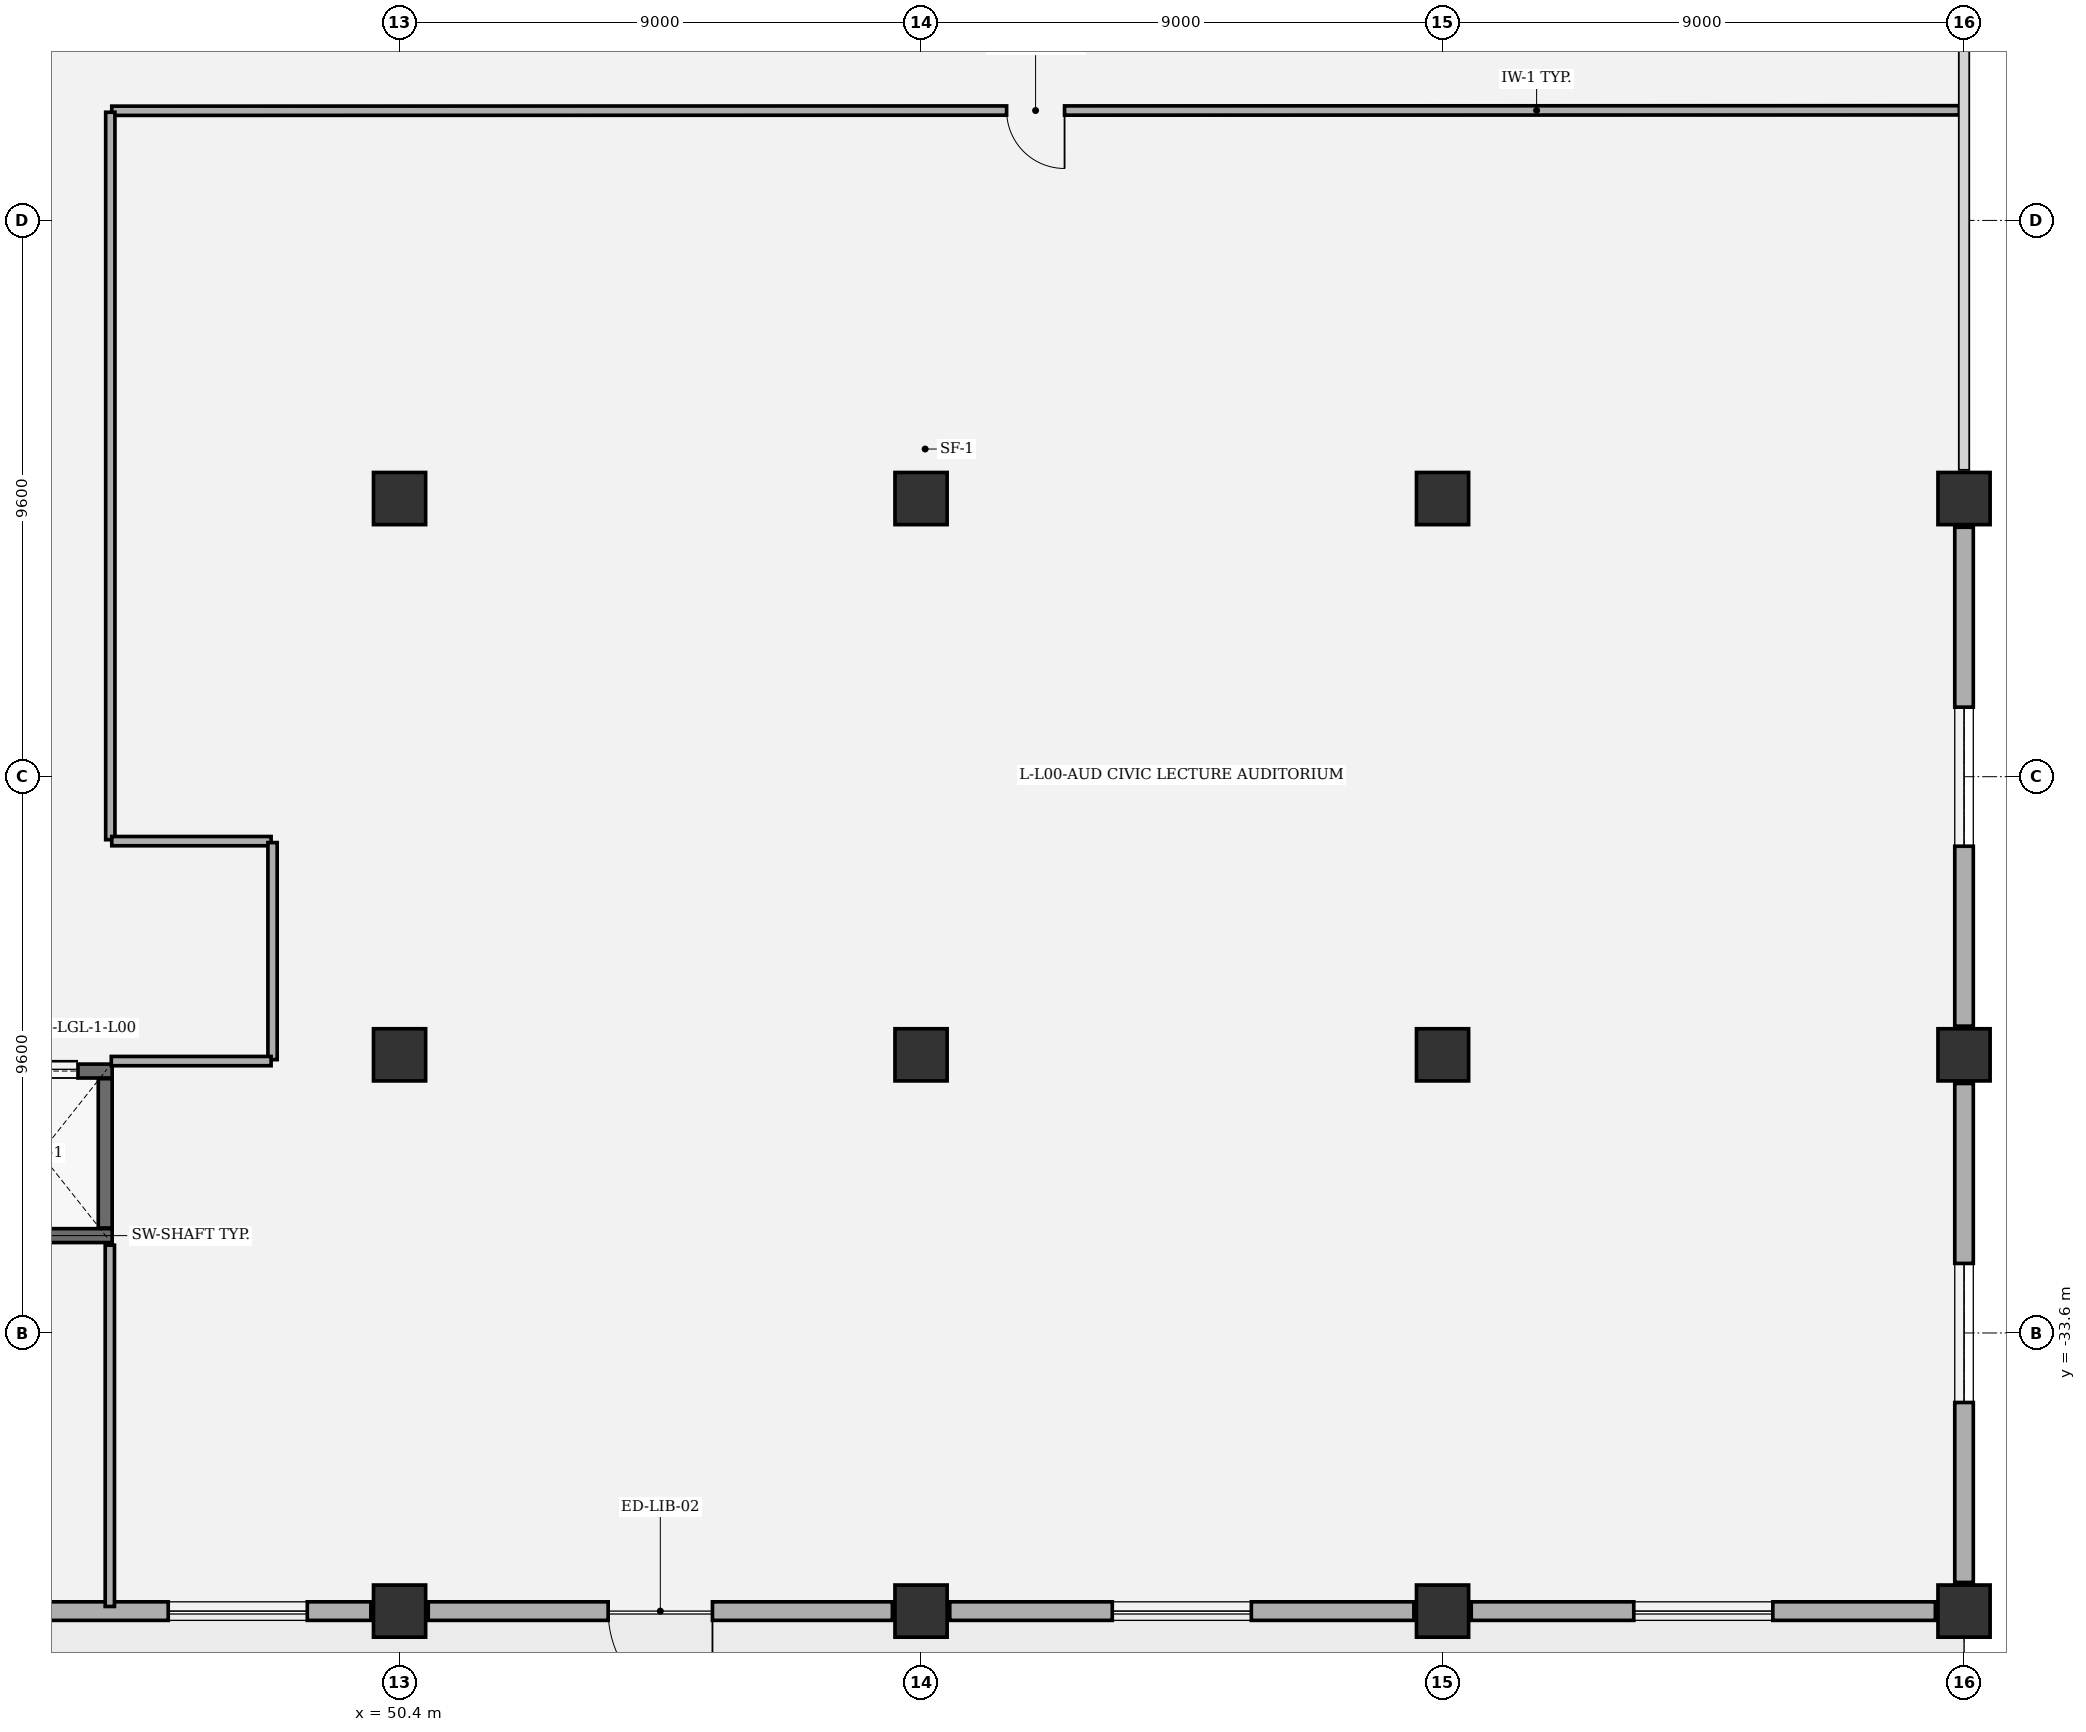
"""IFC4 building model, lengths in metres.
Left out: names, types, materials, properties, quantities, classifications, styles, units other than length and angle.
Written with IfcOpenShell. Run it as: python <this file> out.ifc"""

import sys

from ifc_helpers import new_model, si_unit, direction, frame, frame_2d, origin, origin_2d, place, context, subcontext, project, spatial, rectangle, extrude, element, fill, save


model = new_model("IFC4")
c1 = context("Model", 3, precision=1e-05, world=origin(), true_north=direction((0.0, 1.0)))
c2 = subcontext(c1, "Body", "Model", "MODEL_VIEW")
j1 = project(units=[si_unit("LENGTHUNIT", "METRE"), si_unit("PLANEANGLEUNIT", "RADIAN")], contexts=[c1])
p1 = place(None, origin())
s1 = spatial("IfcSite", under=j1, at=p1, CompositionType="ELEMENT")
p2 = place(p1, origin())
s2 = spatial("IfcBuilding", under=s1, at=p2, CompositionType="ELEMENT")
p3 = place(p2, origin())
s3 = spatial("IfcBuildingStorey", under=s2, at=p3, CompositionType="ELEMENT", Elevation=0.0)
for number, where, z_axis, x_axis in (
    (1, (50.4, -38.4, 0.0), (0.0, 0.0, 1.0), (1.0, 0.0, 0.0)),
    (2, (50.4, -28.8, 0.0), (0.0, 0.0, 1.0), (1.0, 0.0, 0.0)),
    (3, (50.4, -19.2, 0.0), (0.0, 0.0, 1.0), (1.0, 0.0, 0.0)),
    (4, (59.4, -38.4, 0.0), (0.0, 0.0, 1.0), (1.0, 0.0, 0.0)),
    (5, (59.4, -28.8, 0.0), (0.0, 0.0, 1.0), (1.0, 0.0, 0.0)),
    (6, (59.4, -19.2, 0.0), (0.0, 0.0, 1.0), (1.0, 0.0, 0.0)),
    (7, (68.4, -38.4, 0.0), (0.0, 0.0, 1.0), (1.0, 0.0, 0.0)),
    (8, (68.4, -28.8, 0.0), (0.0, 0.0, 1.0), (1.0, 0.0, 0.0)),
    (9, (68.4, -19.2, 0.0), (0.0, 0.0, 1.0), (1.0, 0.0, 0.0)),
    (10, (77.4, -38.4, 0.0), (0.0, 0.0, 1.0), (1.0, 0.0, 0.0)),
    (11, (77.4, -28.8, 0.0), (0.0, 0.0, 1.0), (1.0, 0.0, 0.0)),
    (12, (77.4, -19.2, 0.0), (0.0, 0.0, 1.0), (1.0, 0.0, 0.0)),
):
    element("IfcColumn", number, at=place(p3, frame(where, z_axis=z_axis, x_axis=x_axis)), inside=s3, PredefinedType="COLUMN", context=c2, shape_type="SweptSolid", body=[
        extrude(rectangle(XDim=0.9, YDim=0.9, at=origin_2d()), origin(), (0.0, 0.0, 1.0), 6.6),
    ])
p4 = place(p3, frame((77.4, -29.295, 0.0), z_axis=(0.0, 0.0, 1.0), x_axis=(0.0, -1.0, 0.0)))
e13 = element("IfcWall", 13, at=p4, inside=s3, PredefinedType="SOLIDWALL", context=c2, shape_type="SweptSolid", body=[
    extrude(rectangle(XDim=8.61, YDim=0.32, at=frame_2d((4.305, 0.0))), origin(), (0.0, 0.0, 1.0), 5.537),
])
p5 = place(p4, frame((3.105, 0.0, 0.8)))
e14 = element("IfcOpeningElement", 14, at=p5, cuts=e13, PredefinedType="OPENING", context=c2, shape_type="SweptSolid", body=[
    extrude(rectangle(XDim=2.4, YDim=1.65, at=frame_2d((1.2, 0.825))), frame((0.0, 0.17, 0.0), z_axis=(0.0, -1.0, 0.0), x_axis=(1.0, 0.0, 0.0)), (0.0, 0.0, 1.0), 0.34),
])
p6 = place(p3, frame((77.4, -19.695, 0.0), z_axis=(0.0, 0.0, 1.0), x_axis=(0.0, -1.0, 0.0)))
e15 = element("IfcWall", 15, at=p6, inside=s3, PredefinedType="SOLIDWALL", context=c2, shape_type="SweptSolid", body=[
    extrude(rectangle(XDim=8.61, YDim=0.32, at=frame_2d((4.305, 0.0))), origin(), (0.0, 0.0, 1.0), 5.537),
])
p7 = place(p6, frame((3.105, 0.0, 0.8)))
e16 = element("IfcOpeningElement", 16, at=p7, cuts=e15, PredefinedType="OPENING", context=c2, shape_type="SweptSolid", body=[
    extrude(rectangle(XDim=2.4, YDim=1.65, at=frame_2d((1.2, 0.825))), frame((0.0, 0.17, 0.0), z_axis=(0.0, -1.0, 0.0), x_axis=(1.0, 0.0, 0.0)), (0.0, 0.0, 1.0), 0.34),
])
p8 = place(p3, frame((49.905, -38.4, 0.0), z_axis=(0.0, 0.0, 1.0), x_axis=(-1.0, 0.0, 0.0)))
e17 = element("IfcWall", 17, at=p8, inside=s3, PredefinedType="SOLIDWALL", context=c2, shape_type="SweptSolid", body=[
    extrude(rectangle(XDim=8.01, YDim=0.32, at=frame_2d((4.005, 0.0))), origin(), (0.0, 0.0, 1.0), 5.537),
])
p9 = place(p8, frame((1.097, 0.0, 0.8)))
e18 = element("IfcOpeningElement", 18, at=p9, cuts=e17, PredefinedType="OPENING", context=c2, shape_type="SweptSolid", body=[
    extrude(rectangle(XDim=2.4, YDim=1.65, at=frame_2d((1.2, 0.825))), frame((0.0, 0.17, 0.0), z_axis=(0.0, -1.0, 0.0), x_axis=(1.0, 0.0, 0.0)), (0.0, 0.0, 1.0), 0.34),
])
p10 = place(p3, frame((58.905, -38.4, 0.0), z_axis=(0.0, 0.0, 1.0), x_axis=(-1.0, 0.0, 0.0)))
e19 = element("IfcWall", 19, at=p10, inside=s3, PredefinedType="SOLIDWALL", context=c2, shape_type="SweptSolid", body=[
    extrude(rectangle(XDim=8.01, YDim=0.32, at=frame_2d((4.005, 0.0))), origin(), (0.0, 0.0, 1.0), 5.537),
])
p11 = place(p10, frame((3.105, 0.0, 0.0)))
e20 = element("IfcOpeningElement", 20, at=p11, cuts=e19, PredefinedType="OPENING", context=c2, shape_type="SweptSolid", body=[
    extrude(rectangle(XDim=1.8, YDim=2.35, at=frame_2d((0.9, 1.175))), frame((0.0, 0.17, 0.0), z_axis=(0.0, -1.0, 0.0), x_axis=(1.0, 0.0, 0.0)), (0.0, 0.0, 1.0), 0.34),
])
p12 = place(p3, frame((67.905, -38.4, 0.0), z_axis=(0.0, 0.0, 1.0), x_axis=(-1.0, 0.0, 0.0)))
e21 = element("IfcWall", 21, at=p12, inside=s3, PredefinedType="SOLIDWALL", context=c2, shape_type="SweptSolid", body=[
    extrude(rectangle(XDim=8.01, YDim=0.32, at=frame_2d((4.005, 0.0))), origin(), (0.0, 0.0, 1.0), 5.537),
])
p13 = place(p12, frame((2.805, 0.0, 0.8)))
e22 = element("IfcOpeningElement", 22, at=p13, cuts=e21, PredefinedType="OPENING", context=c2, shape_type="SweptSolid", body=[
    extrude(rectangle(XDim=2.4, YDim=1.65, at=frame_2d((1.2, 0.825))), frame((0.0, 0.17, 0.0), z_axis=(0.0, -1.0, 0.0), x_axis=(1.0, 0.0, 0.0)), (0.0, 0.0, 1.0), 0.34),
])
p14 = place(p3, frame((76.905, -38.4, 0.0), z_axis=(0.0, 0.0, 1.0), x_axis=(-1.0, 0.0, 0.0)))
e23 = element("IfcWall", 23, at=p14, inside=s3, PredefinedType="SOLIDWALL", context=c2, shape_type="SweptSolid", body=[
    extrude(rectangle(XDim=8.01, YDim=0.32, at=frame_2d((4.005, 0.0))), origin(), (0.0, 0.0, 1.0), 5.537),
])
p15 = place(p14, frame((2.805, 0.0, 0.8)))
e24 = element("IfcOpeningElement", 24, at=p15, cuts=e23, PredefinedType="OPENING", context=c2, shape_type="SweptSolid", body=[
    extrude(rectangle(XDim=2.4, YDim=1.65, at=frame_2d((1.2, 0.825))), frame((0.0, 0.17, 0.0), z_axis=(0.0, -1.0, 0.0), x_axis=(1.0, 0.0, 0.0)), (0.0, 0.0, 1.0), 0.34),
])
p16 = place(p3, frame((45.44, -31.92, 0.0), z_axis=(0.0, 0.0, 1.0), x_axis=(-1.0, 0.0, 0.0)))
e25 = element("IfcWall", 25, at=p16, inside=s3, PredefinedType="SHEAR", context=c2, shape_type="SweptSolid", body=[
    extrude(rectangle(XDim=2.48, YDim=0.24, at=frame_2d((1.24, 0.0))), origin(), (0.0, 0.0, 1.0), 6.34),
])
p17 = place(p3, frame((42.96, -29.08, 0.0), z_axis=(0.0, 0.0, 1.0), x_axis=(1.0, 0.0, 0.0)))
e26 = element("IfcWall", 26, at=p17, inside=s3, PredefinedType="SHEAR", context=c2, shape_type="SweptSolid", body=[
    extrude(rectangle(XDim=2.48, YDim=0.24, at=frame_2d((1.24, 0.0))), origin(), (0.0, 0.0, 1.0), 6.34),
])
p18 = place(p17, frame((0.59, 0.0, 0.0)))
e27 = element("IfcOpeningElement", 27, at=p18, cuts=e26, PredefinedType="OPENING", context=c2, shape_type="SweptSolid", body=[
    extrude(rectangle(XDim=1.3, YDim=2.3, at=frame_2d((0.65, 1.15))), frame((0.0, 0.13, 0.0), z_axis=(0.0, -1.0, 0.0), x_axis=(1.0, 0.0, 0.0)), (0.0, 0.0, 1.0), 0.26),
])
p19 = place(p3, frame((45.32, -29.212, 0.0), z_axis=(0.0, 0.0, 1.0), x_axis=(0.0, -1.0, 0.0)))
e28 = element("IfcWall", 28, at=p19, inside=s3, PredefinedType="SHEAR", context=c2, shape_type="SweptSolid", body=[
    extrude(rectangle(XDim=2.576, YDim=0.24, at=frame_2d((1.288, 0.0))), origin(), (0.0, 0.0, 1.0), 6.34),
])
p20 = place(p3, frame((77.32, -12.5, 0.0), z_axis=(0.0, 0.0, 1.0), x_axis=(-0.999999968081, -0.000252662519, 0.0)))
e29 = element("IfcWall", 29, at=p20, inside=s3, PredefinedType="PARTITIONING", context=c2, shape_type="SweptSolid", body=[
    extrude(rectangle(XDim=31.887, YDim=0.16, at=frame_2d((15.943, 0.0))), origin(), (0.0, 0.0, 1.0), 6.34),
])
p21 = place(p20, frame((15.444, 0.0, 0.0)))
e30 = element("IfcOpeningElement", 30, at=p21, cuts=e29, PredefinedType="OPENING", context=c2, shape_type="SweptSolid", body=[
    extrude(rectangle(XDim=1.0, YDim=2.15, at=frame_2d((0.5, 1.075))), frame((0.0, 0.09, 0.0), z_axis=(0.0, -1.0, 0.0), x_axis=(1.0, 0.0, 0.0)), (0.0, 0.0, 1.0), 0.18),
])
p22 = place(p3, frame((45.408, -12.533, 0.0), z_axis=(0.0, 0.0, 1.0), x_axis=(0.0, -1.0, 0.0)))
e31 = element("IfcWall", 31, at=p22, inside=s3, PredefinedType="PARTITIONING", context=c2, shape_type="SweptSolid", body=[
    extrude(rectangle(XDim=12.554, YDim=0.16, at=frame_2d((6.277, 0.0))), origin(), (0.0, 0.0, 1.0), 6.34),
])
p23 = place(p3, frame((48.183, -25.112, 0.0), z_axis=(0.0, 0.0, 1.0), x_axis=(-1.0, 0.0, 0.0)))
e32 = element("IfcWall", 32, at=p23, inside=s3, PredefinedType="PARTITIONING", context=c2, shape_type="SweptSolid", body=[
    extrude(rectangle(XDim=2.75, YDim=0.16, at=frame_2d((1.375, 0.0))), origin(), (0.0, 0.0, 1.0), 6.34),
])
p24 = place(p3, frame((48.208, -25.137, 0.0), z_axis=(0.0, 0.0, 1.0), x_axis=(0.0, -1.0, 0.0)))
e33 = element("IfcWall", 33, at=p24, inside=s3, PredefinedType="PARTITIONING", context=c2, shape_type="SweptSolid", body=[
    extrude(rectangle(XDim=3.746, YDim=0.16, at=frame_2d((1.873, 0.0))), origin(), (0.0, 0.0, 1.0), 6.34),
])
p25 = place(p3, frame((45.425, -28.908, 0.0), z_axis=(0.0, 0.0, 1.0), x_axis=(1.0, 0.0, 0.0)))
e34 = element("IfcWall", 34, at=p25, inside=s3, PredefinedType="PARTITIONING", context=c2, shape_type="SweptSolid", body=[
    extrude(rectangle(XDim=2.758, YDim=0.16, at=frame_2d((1.379, 0.0))), origin(), (0.0, 0.0, 1.0), 5.614),
])
p26 = place(p3, frame((45.4, -32.085, 0.0), z_axis=(0.0, 0.0, 1.0), x_axis=(0.0, -1.0, 0.0)))
e35 = element("IfcWall", 35, at=p26, inside=s3, PredefinedType="PARTITIONING", context=c2, shape_type="SweptSolid", body=[
    extrude(rectangle(XDim=6.235, YDim=0.16, at=frame_2d((3.118, 0.0))), origin(), (0.0, 0.0, 1.0), 6.34),
])
p27 = place(p5, origin())
e36 = element("IfcWindow", 36, at=p27, inside=s3, PartitioningType="SINGLE_PANEL", PredefinedType="WINDOW", context=c2, shape_type="SweptSolid", body=[
    extrude(rectangle(XDim=2.4, YDim=1.65, at=frame_2d((1.2, 0.825))), frame((0.0, 0.03, 0.0), z_axis=(0.0, -1.0, 0.0), x_axis=(1.0, 0.0, 0.0)), (0.0, 0.0, 1.0), 0.06),
])
fill(e14, e36)
p28 = place(p7, origin())
e37 = element("IfcWindow", 37, at=p28, inside=s3, PartitioningType="SINGLE_PANEL", PredefinedType="WINDOW", context=c2, shape_type="SweptSolid", body=[
    extrude(rectangle(XDim=2.4, YDim=1.65, at=frame_2d((1.2, 0.825))), frame((0.0, 0.03, 0.0), z_axis=(0.0, -1.0, 0.0), x_axis=(1.0, 0.0, 0.0)), (0.0, 0.0, 1.0), 0.06),
])
fill(e16, e37)
p29 = place(p9, origin())
e38 = element("IfcWindow", 38, at=p29, inside=s3, PartitioningType="SINGLE_PANEL", PredefinedType="WINDOW", context=c2, shape_type="SweptSolid", body=[
    extrude(rectangle(XDim=2.4, YDim=1.65, at=frame_2d((1.2, 0.825))), frame((0.0, 0.03, 0.0), z_axis=(0.0, -1.0, 0.0), x_axis=(1.0, 0.0, 0.0)), (0.0, 0.0, 1.0), 0.06),
])
fill(e18, e38)
p30 = place(p11, origin())
e39 = element("IfcDoor", 39, at=p30, inside=s3, OperationType="SINGLE_SWING_LEFT", PredefinedType="DOOR", context=c2, shape_type="SweptSolid", body=[
    extrude(rectangle(XDim=1.8, YDim=2.35, at=frame_2d((0.9, 1.175))), frame((0.0, 0.025, 0.0), z_axis=(0.0, -1.0, 0.0), x_axis=(1.0, 0.0, 0.0)), (0.0, 0.0, 1.0), 0.05),
])
fill(e20, e39)
p31 = place(p13, origin())
e40 = element("IfcWindow", 40, at=p31, inside=s3, PartitioningType="SINGLE_PANEL", PredefinedType="WINDOW", context=c2, shape_type="SweptSolid", body=[
    extrude(rectangle(XDim=2.4, YDim=1.65, at=frame_2d((1.2, 0.825))), frame((0.0, 0.03, 0.0), z_axis=(0.0, -1.0, 0.0), x_axis=(1.0, 0.0, 0.0)), (0.0, 0.0, 1.0), 0.06),
])
fill(e22, e40)
p32 = place(p15, origin())
e41 = element("IfcWindow", 41, at=p32, inside=s3, PartitioningType="SINGLE_PANEL", PredefinedType="WINDOW", context=c2, shape_type="SweptSolid", body=[
    extrude(rectangle(XDim=2.4, YDim=1.65, at=frame_2d((1.2, 0.825))), frame((0.0, 0.03, 0.0), z_axis=(0.0, -1.0, 0.0), x_axis=(1.0, 0.0, 0.0)), (0.0, 0.0, 1.0), 0.06),
])
fill(e24, e41)
p33 = place(p18, origin())
e42 = element("IfcDoor", 42, at=p33, inside=s3, OperationType="DOUBLE_DOOR_SLIDING", PredefinedType="DOOR", context=c2, shape_type="SweptSolid", body=[
    extrude(rectangle(XDim=1.3, YDim=2.3, at=frame_2d((0.65, 1.15))), frame((0.0, 0.025, 0.0), z_axis=(0.0, -1.0, 0.0), x_axis=(1.0, 0.0, 0.0)), (0.0, 0.0, 1.0), 0.05),
])
fill(e27, e42)
p34 = place(p21, origin())
e43 = element("IfcDoor", 43, at=p34, inside=s3, OperationType="SINGLE_SWING_LEFT", PredefinedType="DOOR", context=c2, shape_type="SweptSolid", body=[
    extrude(rectangle(XDim=1.0, YDim=2.15, at=frame_2d((0.5, 1.075))), frame((0.0, 0.025, 0.0), z_axis=(0.0, -1.0, 0.0), x_axis=(1.0, 0.0, 0.0)), (0.0, 0.0, 1.0), 0.05),
])
fill(e30, e43)
save(model, sys.argv[1])
